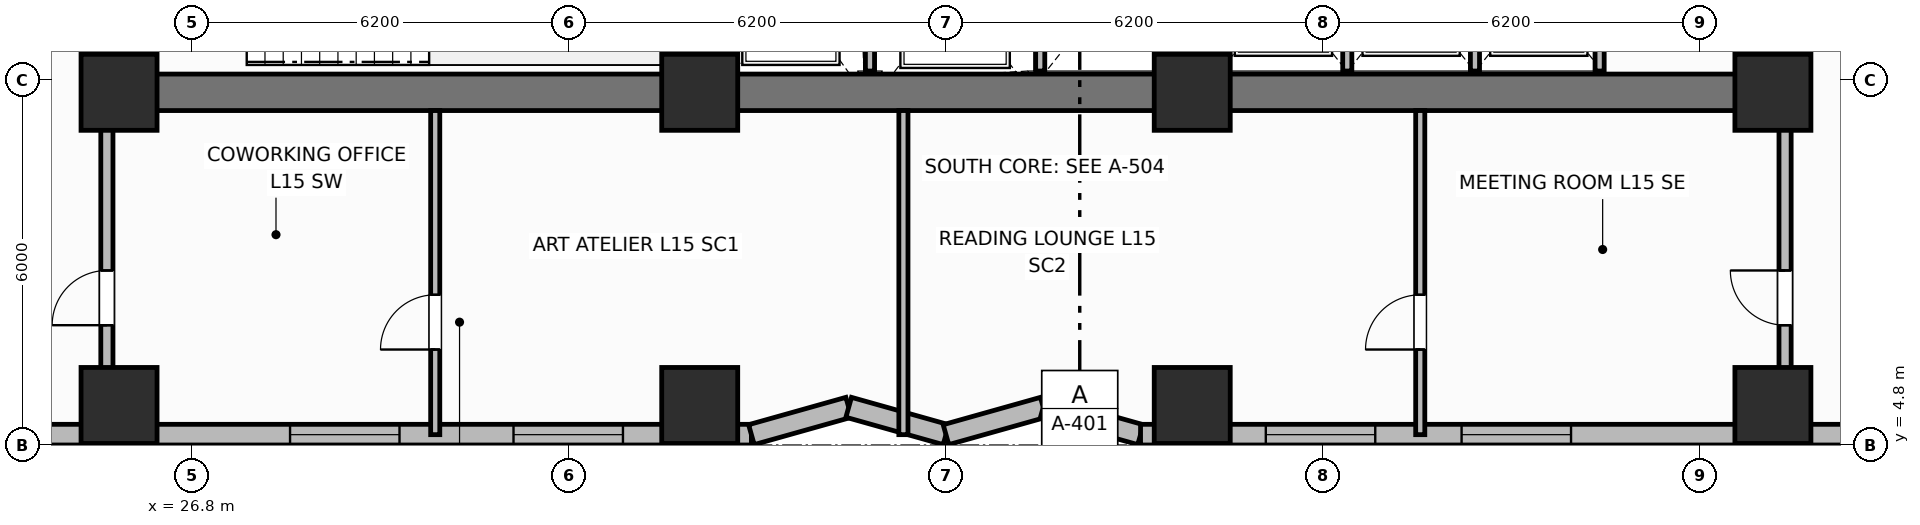
"""IFC4 building model, lengths in metres.
Left out: names, types, materials, properties, quantities, classifications, styles, units other than length and angle.
Written with IfcOpenShell. Run it as: python <this file> out.ifc"""

import sys

from ifc_helpers import new_model, si_unit, direction, frame, frame_2d, origin, origin_2d, place, context, subcontext, project, spatial, rectangle, extrude, element, fill, save


model = new_model("IFC4")
c1 = context("Model", 3, precision=1e-05, world=origin(), true_north=direction((0.0, 1.0)))
c2 = subcontext(c1, "Body", "Model", "MODEL_VIEW")
j1 = project(units=[si_unit("LENGTHUNIT", "METRE"), si_unit("PLANEANGLEUNIT", "RADIAN")], contexts=[c1])
p1 = place(None, origin())
s1 = spatial("IfcSite", under=j1, at=p1, CompositionType="ELEMENT")
p2 = place(p1, origin())
s2 = spatial("IfcBuilding", under=s1, at=p2, CompositionType="ELEMENT")
p3 = place(p2, frame((0.0, 0.0, 62.1)))
s3 = spatial("IfcBuildingStorey", under=s2, at=p3, CompositionType="ELEMENT", Elevation=62.1)
p4 = place(p3, frame((52.8, 10.6, 0.0), z_axis=(0.0, 0.0, 1.0), x_axis=(-1.0, 0.0, 0.0)))
e1 = element("IfcWall", 1, at=p4, inside=s3, PredefinedType="SHEAR", context=c2, shape_type="SweptSolid", body=[
    extrude(rectangle(XDim=27.2, YDim=0.6, at=frame_2d((13.6, 0.0))), origin(), (0.0, 0.0, 1.0), 3.7),
])
for number, where, z_axis, x_axis in (
    (2, (25.6, 10.9, 0.0), (0.0, 0.0, 1.0), (0.0, 1.0, 0.0)),
    (3, (52.8, 10.9, 0.0), (0.0, 0.0, 1.0), (0.0, 1.0, 0.0)),
):
    element("IfcWall", number, at=place(p3, frame(where, z_axis=z_axis, x_axis=x_axis)), inside=s3, PredefinedType="SHEAR", context=c2, shape_type="SweptSolid", body=[
        extrude(rectangle(XDim=5.6, YDim=0.6, at=frame_2d((2.8, 0.0))), origin(), (0.0, 0.0, 1.0), 3.7),
    ])
for number, where, z_axis, x_axis in (
    (4, (35.15, 10.9, 0.0), (0.0, 0.0, 1.0), (0.0, 1.0, 0.0)),
    (5, (43.25, 10.9, 0.0), (0.0, 0.0, 1.0), (0.0, 1.0, 0.0)),
):
    element("IfcWall", number, at=place(p3, frame(where, z_axis=z_axis, x_axis=x_axis)), inside=s3, PredefinedType="SHEAR", context=c2, shape_type="SweptSolid", body=[
        extrude(rectangle(XDim=5.6, YDim=0.4, at=frame_2d((2.8, 0.0))), origin(), (0.0, 0.0, 1.0), 3.7),
    ])
for number, where, z_axis, x_axis in (
    (6, (25.6, 10.6, 0.0), (0.0, 0.0, 1.0), (1.0, 0.0, 0.0)),
    (7, (35.15, 10.6, 0.0), (0.0, 0.0, 1.0), (1.0, 0.0, 0.0)),
    (8, (43.25, 10.6, 0.0), (0.0, 0.0, 1.0), (1.0, 0.0, 0.0)),
    (9, (52.8, 10.6, 0.0), (0.0, 0.0, 1.0), (1.0, 0.0, 0.0)),
    (10, (25.6, 5.45, 0.0), (0.0, 0.0, 1.0), (1.0, 0.0, 0.0)),
    (11, (35.15, 5.45, 0.0), (0.0, 0.0, 1.0), (1.0, 0.0, 0.0)),
    (12, (43.25, 5.45, 0.0), (0.0, 0.0, 1.0), (1.0, 0.0, 0.0)),
    (13, (52.8, 5.45, 0.0), (0.0, 0.0, 1.0), (1.0, 0.0, 0.0)),
):
    element("IfcColumn", number, at=place(p3, frame(where, z_axis=z_axis, x_axis=x_axis)), inside=s3, PredefinedType="COLUMN", context=c2, shape_type="SweptSolid", body=[
        extrude(rectangle(XDim=1.25, YDim=1.25, at=origin_2d()), origin(), (0.0, 0.0, 1.0), 3.7),
    ])
p5 = place(p3, frame((18.6, 4.97, 0.0), z_axis=(0.0, 0.0, 1.0), x_axis=(1.0, 0.0, 0.0)))
e14 = element("IfcWall", 14, at=p5, inside=s3, PredefinedType="SOLIDWALL", context=c2, shape_type="SweptSolid", body=[
    extrude(rectangle(XDim=17.4, YDim=0.34, at=frame_2d((8.7, 0.0))), origin(), (0.0, 0.0, 1.0), 2.7),
])
p6 = place(p5, frame((1.413, 0.0, 0.73)))
e15 = element("IfcOpeningElement", 15, at=p6, cuts=e14, PredefinedType="OPENING", context=c2, shape_type="SweptSolid", body=[
    extrude(rectangle(XDim=1.8, YDim=1.85, at=frame_2d((0.9, 0.925))), frame((0.0, 0.18, 0.0), z_axis=(0.0, -1.0, 0.0), x_axis=(1.0, 0.0, 0.0)), (0.0, 0.0, 1.0), 0.36),
])
p7 = place(p5, frame((9.812, 0.0, 0.73)))
e16 = element("IfcOpeningElement", 16, at=p7, cuts=e14, PredefinedType="OPENING", context=c2, shape_type="SweptSolid", body=[
    extrude(rectangle(XDim=1.8, YDim=1.85, at=frame_2d((0.9, 0.925))), frame((0.0, 0.18, 0.0), z_axis=(0.0, -1.0, 0.0), x_axis=(1.0, 0.0, 0.0)), (0.0, 0.0, 1.0), 0.36),
])
p8 = place(p5, frame((13.488, 0.0, 0.73)))
e17 = element("IfcOpeningElement", 17, at=p8, cuts=e14, PredefinedType="OPENING", context=c2, shape_type="SweptSolid", body=[
    extrude(rectangle(XDim=1.8, YDim=1.85, at=frame_2d((0.9, 0.925))), frame((0.0, 0.18, 0.0), z_axis=(0.0, -1.0, 0.0), x_axis=(1.0, 0.0, 0.0)), (0.0, 0.0, 1.0), 0.36),
])
p9 = place(p3, frame((36.0, 4.97, 0.0), z_axis=(0.0, 0.0, 1.0), x_axis=(0.962662902433, 0.270703040766, 0.0)))
e18 = element("IfcWall", 18, at=p9, inside=s3, PredefinedType="SOLIDWALL", context=c2, shape_type="SweptSolid", body=[
    extrude(rectangle(XDim=1.662, YDim=0.34, at=frame_2d((0.831, 0.0))), origin(), (0.0, 0.0, 1.0), 2.7),
])
p10 = place(p3, frame((37.6, 5.42, 0.0), z_axis=(0.0, 0.0, 1.0), x_axis=(0.962652136636, -0.270741322725, 0.0)))
e19 = element("IfcWall", 19, at=p10, inside=s3, PredefinedType="SOLIDWALL", context=c2, shape_type="SweptSolid", body=[
    extrude(rectangle(XDim=1.662, YDim=0.34, at=frame_2d((0.831, 0.0))), origin(), (0.0, 0.0, 1.0), 2.7),
])
p11 = place(p3, frame((39.2, 4.97, 0.0), z_axis=(0.0, 0.0, 1.0), x_axis=(0.962662902433, 0.270703040766, 0.0)))
e20 = element("IfcWall", 20, at=p11, inside=s3, PredefinedType="SOLIDWALL", context=c2, shape_type="SweptSolid", body=[
    extrude(rectangle(XDim=1.662, YDim=0.34, at=frame_2d((0.831, 0.0))), origin(), (0.0, 0.0, 1.0), 2.7),
])
p12 = place(p3, frame((40.8, 5.42, 0.0), z_axis=(0.0, 0.0, 1.0), x_axis=(0.962652136636, -0.270741322725, 0.0)))
e21 = element("IfcWall", 21, at=p12, inside=s3, PredefinedType="SOLIDWALL", context=c2, shape_type="SweptSolid", body=[
    extrude(rectangle(XDim=1.662, YDim=0.34, at=frame_2d((0.831, 0.0))), origin(), (0.0, 0.0, 1.0), 2.7),
])
p13 = place(p3, frame((42.4, 4.97, 0.0), z_axis=(0.0, 0.0, 1.0), x_axis=(1.0, 0.0, 0.0)))
e22 = element("IfcWall", 22, at=p13, inside=s3, PredefinedType="SOLIDWALL", context=c2, shape_type="SweptSolid", body=[
    extrude(rectangle(XDim=17.4, YDim=0.34, at=frame_2d((8.7, 0.0))), origin(), (0.0, 0.0, 1.0), 2.7),
])
p14 = place(p13, frame((2.06, 0.0, 0.73)))
e23 = element("IfcOpeningElement", 23, at=p14, cuts=e22, PredefinedType="OPENING", context=c2, shape_type="SweptSolid", body=[
    extrude(rectangle(XDim=1.8, YDim=1.85, at=frame_2d((0.9, 0.925))), frame((0.0, 0.18, 0.0), z_axis=(0.0, -1.0, 0.0), x_axis=(1.0, 0.0, 0.0)), (0.0, 0.0, 1.0), 0.36),
])
p15 = place(p13, frame((5.28, 0.0, 0.73)))
e24 = element("IfcOpeningElement", 24, at=p15, cuts=e22, PredefinedType="OPENING", context=c2, shape_type="SweptSolid", body=[
    extrude(rectangle(XDim=1.8, YDim=1.85, at=frame_2d((0.9, 0.925))), frame((0.0, 0.18, 0.0), z_axis=(0.0, -1.0, 0.0), x_axis=(1.0, 0.0, 0.0)), (0.0, 0.0, 1.0), 0.36),
])
p16 = place(p13, frame((14.24, 0.0, 0.73)))
e25 = element("IfcOpeningElement", 25, at=p16, cuts=e22, PredefinedType="OPENING", context=c2, shape_type="SweptSolid", body=[
    extrude(rectangle(XDim=1.8, YDim=1.85, at=frame_2d((0.9, 0.925))), frame((0.0, 0.18, 0.0), z_axis=(0.0, -1.0, 0.0), x_axis=(1.0, 0.0, 0.0)), (0.0, 0.0, 1.0), 0.36),
])
for number, where, z_axis, x_axis in (
    (26, (37.95, 10.95, 0.0), (0.0, 0.0, 1.0), (0.0, 1.0, 0.0)),
    (27, (40.75, 10.95, 0.0), (0.0, 0.0, 1.0), (0.0, 1.0, 0.0)),
):
    element("IfcWall", number, at=place(p3, frame(where, z_axis=z_axis, x_axis=x_axis)), inside=s3, PredefinedType="PARTITIONING", context=c2, shape_type="SweptSolid", body=[
        extrude(rectangle(XDim=2.75, YDim=0.15, at=frame_2d((1.375, 0.0))), origin(), (0.0, 0.0, 1.0), 2.53),
    ])
for number, where, z_axis, x_axis in (
    (28, (45.8, 10.95, 0.0), (0.0, 0.0, 1.0), (0.0, 1.0, 0.0)),
    (29, (47.9, 10.95, 0.0), (0.0, 0.0, 1.0), (0.0, 1.0, 0.0)),
    (30, (49.95, 10.95, 0.0), (0.0, 0.0, 1.0), (0.0, 1.0, 0.0)),
):
    element("IfcWall", number, at=place(p3, frame(where, z_axis=z_axis, x_axis=x_axis)), inside=s3, PredefinedType="PARTITIONING", context=c2, shape_type="SweptSolid", body=[
        extrude(rectangle(XDim=2.7, YDim=0.15, at=frame_2d((1.35, 0.0))), origin(), (0.0, 0.0, 1.0), 2.53),
    ])
p17 = place(p3, frame((30.8, 4.97, 0.0), z_axis=(0.0, 0.0, 1.0), x_axis=(0.0, 1.0, 0.0)))
e31 = element("IfcWall", 31, at=p17, inside=s3, PredefinedType="PARTITIONING", context=c2, shape_type="SweptSolid", body=[
    extrude(rectangle(XDim=5.33, YDim=0.15, at=frame_2d((2.665, 0.0))), origin(), (0.0, 0.0, 1.0), 2.53),
])
p18 = place(p17, frame((1.4, 0.0, 0.0)))
e32 = element("IfcOpeningElement", 32, at=p18, cuts=e31, PredefinedType="OPENING", context=c2, shape_type="SweptSolid", body=[
    extrude(rectangle(XDim=0.9, YDim=2.1, at=frame_2d((0.45, 1.05))), frame((0.0, 0.085, 0.0), z_axis=(0.0, -1.0, 0.0), x_axis=(1.0, 0.0, 0.0)), (0.0, 0.0, 1.0), 0.17),
])
p19 = place(p3, frame((38.5, 4.97, 0.0), z_axis=(0.0, 0.0, 1.0), x_axis=(0.0, 1.0, 0.0)))
e33 = element("IfcWall", 33, at=p19, inside=s3, PredefinedType="PARTITIONING", context=c2, shape_type="SweptSolid", body=[
    extrude(rectangle(XDim=5.33, YDim=0.15, at=frame_2d((2.665, 0.0))), origin(), (0.0, 0.0, 1.0), 2.53),
])
p20 = place(p3, frame((47.0, 4.97, 0.0), z_axis=(0.0, 0.0, 1.0), x_axis=(0.0, 1.0, 0.0)))
e34 = element("IfcWall", 34, at=p20, inside=s3, PredefinedType="PARTITIONING", context=c2, shape_type="SweptSolid", body=[
    extrude(rectangle(XDim=5.33, YDim=0.15, at=frame_2d((2.665, 0.0))), origin(), (0.0, 0.0, 1.0), 2.53),
])
p21 = place(p20, frame((1.4, 0.0, 0.0)))
e35 = element("IfcOpeningElement", 35, at=p21, cuts=e34, PredefinedType="OPENING", context=c2, shape_type="SweptSolid", body=[
    extrude(rectangle(XDim=0.9, YDim=2.1, at=frame_2d((0.45, 1.05))), frame((0.0, 0.085, 0.0), z_axis=(0.0, -1.0, 0.0), x_axis=(1.0, 0.0, 0.0)), (0.0, 0.0, 1.0), 0.17),
])
p22 = place(p3, frame((25.4, 5.72, 0.0), z_axis=(0.0, 0.0, 1.0), x_axis=(0.0, 1.0, 0.0)))
e36 = element("IfcWall", 36, at=p22, inside=s3, PredefinedType="PARTITIONING", context=c2, shape_type="SweptSolid", body=[
    extrude(rectangle(XDim=4.58, YDim=0.2, at=frame_2d((2.29, 0.0))), origin(), (0.0, 0.0, 1.0), 2.53),
])
p23 = place(p22, frame((1.05, 0.0, 0.0)))
e37 = element("IfcOpeningElement", 37, at=p23, cuts=e36, PredefinedType="OPENING", context=c2, shape_type="SweptSolid", body=[
    extrude(rectangle(XDim=0.9, YDim=2.1, at=frame_2d((0.45, 1.05))), frame((0.0, 0.11, 0.0), z_axis=(0.0, -1.0, 0.0), x_axis=(1.0, 0.0, 0.0)), (0.0, 0.0, 1.0), 0.22),
])
p24 = place(p3, frame((53.0, 5.72, 0.0), z_axis=(0.0, 0.0, 1.0), x_axis=(0.0, 1.0, 0.0)))
e38 = element("IfcWall", 38, at=p24, inside=s3, PredefinedType="PARTITIONING", context=c2, shape_type="SweptSolid", body=[
    extrude(rectangle(XDim=4.58, YDim=0.2, at=frame_2d((2.29, 0.0))), origin(), (0.0, 0.0, 1.0), 2.53),
])
p25 = place(p24, frame((1.05, 0.0, 0.0)))
e39 = element("IfcOpeningElement", 39, at=p25, cuts=e38, PredefinedType="OPENING", context=c2, shape_type="SweptSolid", body=[
    extrude(rectangle(XDim=0.9, YDim=2.1, at=frame_2d((0.45, 1.05))), frame((0.0, 0.11, 0.0), z_axis=(0.0, -1.0, 0.0), x_axis=(1.0, 0.0, 0.0)), (0.0, 0.0, 1.0), 0.22),
])
p26 = place(p7, origin())
e40 = element("IfcWindow", 40, at=p26, inside=s3, PartitioningType="SINGLE_PANEL", PredefinedType="WINDOW", context=c2, shape_type="SweptSolid", body=[
    extrude(rectangle(XDim=1.8, YDim=1.85, at=frame_2d((0.9, 0.925))), frame((0.0, 0.03, 0.0), z_axis=(0.0, -1.0, 0.0), x_axis=(1.0, 0.0, 0.0)), (0.0, 0.0, 1.0), 0.06),
])
fill(e16, e40)
p27 = place(p8, origin())
e41 = element("IfcWindow", 41, at=p27, inside=s3, PartitioningType="SINGLE_PANEL", PredefinedType="WINDOW", context=c2, shape_type="SweptSolid", body=[
    extrude(rectangle(XDim=1.8, YDim=1.85, at=frame_2d((0.9, 0.925))), frame((0.0, 0.03, 0.0), z_axis=(0.0, -1.0, 0.0), x_axis=(1.0, 0.0, 0.0)), (0.0, 0.0, 1.0), 0.06),
])
fill(e17, e41)
p28 = place(p14, origin())
e42 = element("IfcWindow", 42, at=p28, inside=s3, PartitioningType="SINGLE_PANEL", PredefinedType="WINDOW", context=c2, shape_type="SweptSolid", body=[
    extrude(rectangle(XDim=1.8, YDim=1.85, at=frame_2d((0.9, 0.925))), frame((0.0, 0.03, 0.0), z_axis=(0.0, -1.0, 0.0), x_axis=(1.0, 0.0, 0.0)), (0.0, 0.0, 1.0), 0.06),
])
fill(e23, e42)
p29 = place(p15, origin())
e43 = element("IfcWindow", 43, at=p29, inside=s3, PartitioningType="SINGLE_PANEL", PredefinedType="WINDOW", context=c2, shape_type="SweptSolid", body=[
    extrude(rectangle(XDim=1.8, YDim=1.85, at=frame_2d((0.9, 0.925))), frame((0.0, 0.03, 0.0), z_axis=(0.0, -1.0, 0.0), x_axis=(1.0, 0.0, 0.0)), (0.0, 0.0, 1.0), 0.06),
])
fill(e24, e43)
p30 = place(p18, origin())
e44 = element("IfcDoor", 44, at=p30, inside=s3, OperationType="SINGLE_SWING_LEFT", PredefinedType="DOOR", context=c2, shape_type="SweptSolid", body=[
    extrude(rectangle(XDim=0.9, YDim=2.1, at=frame_2d((0.45, 1.05))), frame((0.0, 0.025, 0.0), z_axis=(0.0, -1.0, 0.0), x_axis=(1.0, 0.0, 0.0)), (0.0, 0.0, 1.0), 0.05),
])
fill(e32, e44)
p31 = place(p21, origin())
e45 = element("IfcDoor", 45, at=p31, inside=s3, OperationType="SINGLE_SWING_LEFT", PredefinedType="DOOR", context=c2, shape_type="SweptSolid", body=[
    extrude(rectangle(XDim=0.9, YDim=2.1, at=frame_2d((0.45, 1.05))), frame((0.0, 0.025, 0.0), z_axis=(0.0, -1.0, 0.0), x_axis=(1.0, 0.0, 0.0)), (0.0, 0.0, 1.0), 0.05),
])
fill(e35, e45)
p32 = place(p23, origin())
e46 = element("IfcDoor", 46, at=p32, inside=s3, OperationType="SINGLE_SWING_LEFT", PredefinedType="DOOR", context=c2, shape_type="SweptSolid", body=[
    extrude(rectangle(XDim=0.9, YDim=2.1, at=frame_2d((0.45, 1.05))), frame((0.0, 0.025, 0.0), z_axis=(0.0, -1.0, 0.0), x_axis=(1.0, 0.0, 0.0)), (0.0, 0.0, 1.0), 0.05),
])
fill(e37, e46)
p33 = place(p25, origin())
e47 = element("IfcDoor", 47, at=p33, inside=s3, OperationType="SINGLE_SWING_RIGHT", PredefinedType="DOOR", context=c2, shape_type="SweptSolid", body=[
    extrude(rectangle(XDim=0.9, YDim=2.1, at=frame_2d((0.45, 1.05))), frame((0.0, 0.025, 0.0), z_axis=(0.0, -1.0, 0.0), x_axis=(1.0, 0.0, 0.0)), (0.0, 0.0, 1.0), 0.05),
])
fill(e39, e47)
save(model, sys.argv[1])
